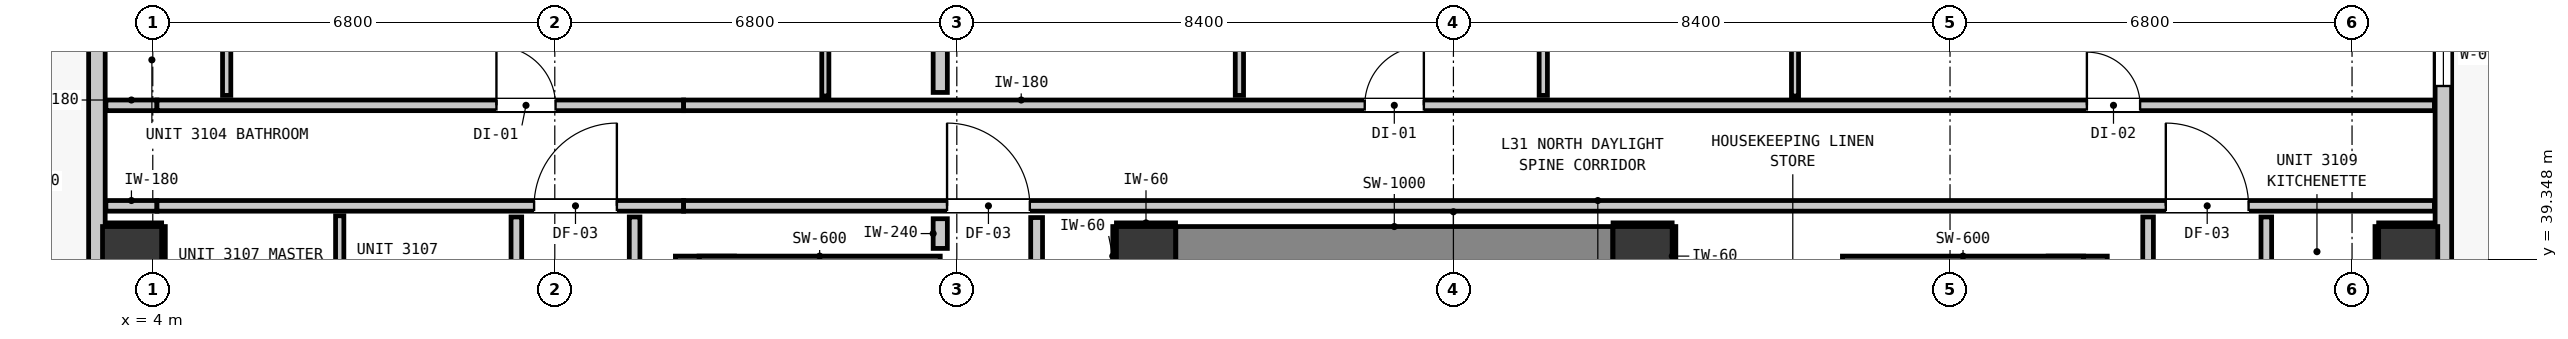
"""IFC4 building model, lengths in metres.
Left out: names, types, materials, properties, quantities, classifications, styles, units other than length and angle.
Written with IfcOpenShell. Run it as: python <this file> out.ifc"""

import sys

from ifc_helpers import new_model, si_unit, direction, frame, frame_2d, origin, origin_2d, place, context, subcontext, project, spatial, rectangle, extrude, element, fill, save


model = new_model("IFC4")
c1 = context("Model", 3, precision=1e-05, world=origin(), true_north=direction((0.0, 1.0)))
c2 = subcontext(c1, "Body", "Model", "MODEL_VIEW")
j1 = project(units=[si_unit("LENGTHUNIT", "METRE"), si_unit("PLANEANGLEUNIT", "RADIAN")], contexts=[c1])
p1 = place(None, origin())
s1 = spatial("IfcSite", under=j1, at=p1, CompositionType="ELEMENT")
p2 = place(p1, origin())
s2 = spatial("IfcBuilding", under=s1, at=p2, CompositionType="ELEMENT")
p3 = place(p2, frame((0.0, 0.0, 109.4)))
s3 = spatial("IfcBuildingStorey", under=s2, at=p3, CompositionType="ELEMENT", Elevation=109.4)
for number, where, z_axis, x_axis in (
    (1, (20.8, 39.4, 0.0), (0.0, 0.0, 1.0), (1.0, 0.0, 0.0)),
    (2, (29.2, 39.4, 0.0), (0.0, 0.0, 1.0), (1.0, 0.0, 0.0)),
):
    element("IfcColumn", number, at=place(p3, frame(where, z_axis=z_axis, x_axis=x_axis)), inside=s3, PredefinedType="COLUMN", context=c2, shape_type="SweptSolid", body=[
        extrude(rectangle(XDim=1.0, YDim=1.0, at=origin_2d()), origin(), (0.0, 0.0, 1.0), 3.32),
    ])
p4 = place(p3, frame((13.34, 31.205, 0.0), z_axis=(0.0, 0.0, 1.0), x_axis=(0.0, 1.0, 0.0)))
e3 = element("IfcWall", 3, at=p4, inside=s3, PredefinedType="SHEAR", context=c2, shape_type="SweptSolid", body=[
    extrude(rectangle(XDim=8.195, YDim=1.0, at=frame_2d((4.097, 0.0))), origin(), (0.0, 0.0, 1.0), 3.32),
])
p5 = place(p3, frame((13.24, 39.1, 0.0), z_axis=(0.0, 0.0, 1.0), x_axis=(1.0, 0.0, 0.0)))
e4 = element("IfcWall", 4, at=p5, inside=s3, PredefinedType="SHEAR", context=c2, shape_type="SweptSolid", body=[
    extrude(rectangle(XDim=4.08, YDim=0.6, at=frame_2d((2.04, 0.0))), origin(), (0.0, 0.0, 1.0), 3.32),
])
p6 = place(p3, frame((36.56, 31.205, 0.0), z_axis=(0.0, 0.0, 1.0), x_axis=(0.0, 1.0, 0.0)))
e5 = element("IfcWall", 5, at=p6, inside=s3, PredefinedType="SHEAR", context=c2, shape_type="SweptSolid", body=[
    extrude(rectangle(XDim=8.195, YDim=1.0, at=frame_2d((4.097, 0.0))), origin(), (0.0, 0.0, 1.0), 3.32),
])
p7 = place(p3, frame((32.58, 39.1, 0.0), z_axis=(0.0, 0.0, 1.0), x_axis=(1.0, 0.0, 0.0)))
e6 = element("IfcWall", 6, at=p7, inside=s3, PredefinedType="SHEAR", context=c2, shape_type="SweptSolid", body=[
    extrude(rectangle(XDim=4.08, YDim=0.6, at=frame_2d((2.04, 0.0))), origin(), (0.0, 0.0, 1.0), 3.32),
])
p8 = place(p3, frame((21.305, 39.4, 0.0), z_axis=(0.0, 0.0, 1.0), x_axis=(1.0, 0.0, 0.0)))
e7 = element("IfcWall", 7, at=p8, inside=s3, PredefinedType="SHEAR", context=c2, shape_type="SweptSolid", body=[
    extrude(rectangle(XDim=7.39, YDim=1.0, at=frame_2d((3.695, 0.0))), origin(), (0.0, 0.0, 1.0), 3.32),
])
for number, where, z_axis, x_axis in (
    (8, (3.65, 39.4, 0.0), (0.0, 0.0, 1.0), (1.0, 0.0, 0.0)),
    (9, (42.15, 39.4, 0.0), (0.0, 0.0, 1.0), (1.0, 0.0, 0.0)),
):
    element("IfcColumn", number, at=place(p3, frame(where, z_axis=z_axis, x_axis=x_axis)), inside=s3, PredefinedType="COLUMN", context=c2, shape_type="SweptSolid", body=[
        extrude(rectangle(XDim=1.0, YDim=1.0, at=origin_2d()), origin(), (0.0, 0.0, 1.0), 3.32),
    ])
p9 = place(p3, frame((3.055, 11.355, 0.0), z_axis=(0.0, 0.0, 1.0), x_axis=(0.0, 1.0, 0.0)))
e10 = element("IfcWall", 10, at=p9, inside=s3, PredefinedType="STANDARD", context=c2, shape_type="SweptSolid", body=[
    extrude(rectangle(XDim=32.29, YDim=0.28, at=frame_2d((16.145, 0.0))), origin(), (0.0, 0.0, 1.0), 3.08),
])
p10 = place(p9, frame((5.818, 0.0, 0.0)))
e11 = element("IfcOpeningElement", 11, at=p10, cuts=e10, PredefinedType="OPENING", context=c2, shape_type="SweptSolid", body=[
    extrude(rectangle(XDim=1.0, YDim=2.15, at=frame_2d((0.5, 1.075))), frame((0.0, 0.15, 0.0), z_axis=(0.0, -1.0, 0.0), x_axis=(1.0, 0.0, 0.0)), (0.0, 0.0, 1.0), 0.3),
])
p11 = place(p9, frame((0.545, 0.0, 0.85)))
e12 = element("IfcOpeningElement", 12, at=p11, cuts=e10, PredefinedType="OPENING", context=c2, shape_type="SweptSolid", body=[
    extrude(rectangle(XDim=1.05, YDim=1.65, at=frame_2d((0.525, 0.825))), frame((0.0, 0.15, 0.0), z_axis=(0.0, -1.0, 0.0), x_axis=(1.0, 0.0, 0.0)), (0.0, 0.0, 1.0), 0.3),
])
p12 = place(p9, frame((13.124, 0.0, 0.85)))
e13 = element("IfcOpeningElement", 13, at=p12, cuts=e10, PredefinedType="OPENING", context=c2, shape_type="SweptSolid", body=[
    extrude(rectangle(XDim=2.7, YDim=2.0, at=frame_2d((1.35, 1.0))), frame((0.0, 0.15, 0.0), z_axis=(0.0, -1.0, 0.0), x_axis=(1.0, 0.0, 0.0)), (0.0, 0.0, 1.0), 0.3),
])
p13 = place(p9, frame((17.188, 0.0, 0.85)))
e14 = element("IfcOpeningElement", 14, at=p13, cuts=e10, PredefinedType="OPENING", context=c2, shape_type="SweptSolid", body=[
    extrude(rectangle(XDim=1.05, YDim=1.65, at=frame_2d((0.525, 0.825))), frame((0.0, 0.15, 0.0), z_axis=(0.0, -1.0, 0.0), x_axis=(1.0, 0.0, 0.0)), (0.0, 0.0, 1.0), 0.3),
])
p14 = place(p9, frame((22.674, 0.0, 0.85)))
e15 = element("IfcOpeningElement", 15, at=p14, cuts=e10, PredefinedType="OPENING", context=c2, shape_type="SweptSolid", body=[
    extrude(rectangle(XDim=2.7, YDim=2.0, at=frame_2d((1.35, 1.0))), frame((0.0, 0.15, 0.0), z_axis=(0.0, -1.0, 0.0), x_axis=(1.0, 0.0, 0.0)), (0.0, 0.0, 1.0), 0.3),
])
p15 = place(p9, frame((26.312, 0.0, 0.85)))
e16 = element("IfcOpeningElement", 16, at=p15, cuts=e10, PredefinedType="OPENING", context=c2, shape_type="SweptSolid", body=[
    extrude(rectangle(XDim=1.05, YDim=1.65, at=frame_2d((0.525, 0.825))), frame((0.0, 0.15, 0.0), z_axis=(0.0, -1.0, 0.0), x_axis=(1.0, 0.0, 0.0)), (0.0, 0.0, 1.0), 0.3),
])
p16 = place(p3, frame((42.745, 43.645, 0.0), z_axis=(0.0, 0.0, 1.0), x_axis=(0.0, -1.0, 0.0)))
e17 = element("IfcWall", 17, at=p16, inside=s3, PredefinedType="STANDARD", context=c2, shape_type="SweptSolid", body=[
    extrude(rectangle(XDim=32.29, YDim=0.28, at=frame_2d((16.145, 0.0))), origin(), (0.0, 0.0, 1.0), 3.08),
])
p17 = place(p16, frame((6.871, 0.0, 0.0)))
e18 = element("IfcOpeningElement", 18, at=p17, cuts=e17, PredefinedType="OPENING", context=c2, shape_type="SweptSolid", body=[
    extrude(rectangle(XDim=1.0, YDim=2.15, at=frame_2d((0.5, 1.075))), frame((0.0, 0.15, 0.0), z_axis=(0.0, -1.0, 0.0), x_axis=(1.0, 0.0, 0.0)), (0.0, 0.0, 1.0), 0.3),
])
p18 = place(p16, frame((0.318, 0.0, 0.85)))
e19 = element("IfcOpeningElement", 19, at=p18, cuts=e17, PredefinedType="OPENING", context=c2, shape_type="SweptSolid", body=[
    extrude(rectangle(XDim=1.05, YDim=1.65, at=frame_2d((0.525, 0.825))), frame((0.0, 0.15, 0.0), z_axis=(0.0, -1.0, 0.0), x_axis=(1.0, 0.0, 0.0)), (0.0, 0.0, 1.0), 0.3),
])
p19 = place(p16, frame((16.37, 0.0, 0.85)))
e20 = element("IfcOpeningElement", 20, at=p19, cuts=e17, PredefinedType="OPENING", context=c2, shape_type="SweptSolid", body=[
    extrude(rectangle(XDim=2.7, YDim=2.0, at=frame_2d((1.35, 1.0))), frame((0.0, 0.15, 0.0), z_axis=(0.0, -1.0, 0.0), x_axis=(1.0, 0.0, 0.0)), (0.0, 0.0, 1.0), 0.3),
])
p20 = place(p16, frame((8.452, 0.0, 0.85)))
e21 = element("IfcOpeningElement", 21, at=p20, cuts=e17, PredefinedType="OPENING", context=c2, shape_type="SweptSolid", body=[
    extrude(rectangle(XDim=1.05, YDim=1.65, at=frame_2d((0.525, 0.825))), frame((0.0, 0.15, 0.0), z_axis=(0.0, -1.0, 0.0), x_axis=(1.0, 0.0, 0.0)), (0.0, 0.0, 1.0), 0.3),
])
p21 = place(p3, frame((3.207, 40.25, 0.0), z_axis=(0.0, 0.0, 1.0), x_axis=(1.0, 0.0, 0.0)))
e22 = element("IfcWall", 22, at=p21, inside=s3, PredefinedType="PARTITIONING", context=c2, shape_type="SweptSolid", body=[
    extrude(rectangle(XDim=0.864, YDim=0.18, at=frame_2d((0.432, 0.0))), origin(), (0.0, 0.0, 1.0), 3.08),
])
p22 = place(p3, frame((4.071, 40.25, 0.0), z_axis=(0.0, 0.0, 1.0), x_axis=(1.0, 0.0, 0.0)))
e23 = element("IfcWall", 23, at=p22, inside=s3, PredefinedType="PARTITIONING", context=c2, shape_type="SweptSolid", body=[
    extrude(rectangle(XDim=8.908, YDim=0.18, at=frame_2d((4.454, 0.0))), origin(), (0.0, 0.0, 1.0), 2.565),
])
p23 = place(p22, frame((6.379, 0.0, 0.0)))
e24 = element("IfcOpeningElement", 24, at=p23, cuts=e23, PredefinedType="OPENING", context=c2, shape_type="SweptSolid", body=[
    extrude(rectangle(XDim=1.4, YDim=2.15, at=frame_2d((0.7, 1.075))), frame((0.0, 0.1, 0.0), z_axis=(0.0, -1.0, 0.0), x_axis=(1.0, 0.0, 0.0)), (0.0, 0.0, 1.0), 0.2),
])
p24 = place(p3, frame((12.979, 40.25, 0.0), z_axis=(0.0, 0.0, 1.0), x_axis=(1.0, 0.0, 0.0)))
e25 = element("IfcWall", 25, at=p24, inside=s3, PredefinedType="PARTITIONING", context=c2, shape_type="SweptSolid", body=[
    extrude(rectangle(XDim=29.614, YDim=0.18, at=frame_2d((14.807, 0.0))), origin(), (0.0, 0.0, 1.0), 3.08),
])
p25 = place(p24, frame((4.456, 0.0, 0.0)))
e26 = element("IfcOpeningElement", 26, at=p25, cuts=e25, PredefinedType="OPENING", context=c2, shape_type="SweptSolid", body=[
    extrude(rectangle(XDim=1.4, YDim=2.15, at=frame_2d((0.7, 1.075))), frame((0.0, 0.1, 0.0), z_axis=(0.0, -1.0, 0.0), x_axis=(1.0, 0.0, 0.0)), (0.0, 0.0, 1.0), 0.2),
])
p26 = place(p24, frame((25.071, 0.0, 0.0)))
e27 = element("IfcOpeningElement", 27, at=p26, cuts=e25, PredefinedType="OPENING", context=c2, shape_type="SweptSolid", body=[
    extrude(rectangle(XDim=1.4, YDim=2.15, at=frame_2d((0.7, 1.075))), frame((0.0, 0.1, 0.0), z_axis=(0.0, -1.0, 0.0), x_axis=(1.0, 0.0, 0.0)), (0.0, 0.0, 1.0), 0.2),
])
p27 = place(p3, frame((3.207, 41.95, 0.0), z_axis=(0.0, 0.0, 1.0), x_axis=(1.0, 0.0, 0.0)))
e28 = element("IfcWall", 28, at=p27, inside=s3, PredefinedType="PARTITIONING", context=c2, shape_type="SweptSolid", body=[
    extrude(rectangle(XDim=0.864, YDim=0.18, at=frame_2d((0.432, 0.0))), origin(), (0.0, 0.0, 1.0), 3.08),
])
p28 = place(p3, frame((4.071, 41.95, 0.0), z_axis=(0.0, 0.0, 1.0), x_axis=(1.0, 0.0, 0.0)))
e29 = element("IfcWall", 29, at=p28, inside=s3, PredefinedType="PARTITIONING", context=c2, shape_type="SweptSolid", body=[
    extrude(rectangle(XDim=8.908, YDim=0.18, at=frame_2d((4.454, 0.0))), origin(), (0.0, 0.0, 1.0), 2.565),
])
p29 = place(p28, frame((5.742, 0.0, 0.0)))
e30 = element("IfcOpeningElement", 30, at=p29, cuts=e29, PredefinedType="OPENING", context=c2, shape_type="SweptSolid", body=[
    extrude(rectangle(XDim=1.0, YDim=2.15, at=frame_2d((0.5, 1.075))), frame((0.0, 0.1, 0.0), z_axis=(0.0, -1.0, 0.0), x_axis=(1.0, 0.0, 0.0)), (0.0, 0.0, 1.0), 0.2),
])
p30 = place(p3, frame((12.979, 41.95, 0.0), z_axis=(0.0, 0.0, 1.0), x_axis=(1.0, 0.0, 0.0)))
e31 = element("IfcWall", 31, at=p30, inside=s3, PredefinedType="PARTITIONING", context=c2, shape_type="SweptSolid", body=[
    extrude(rectangle(XDim=29.614, YDim=0.18, at=frame_2d((14.807, 0.0))), origin(), (0.0, 0.0, 1.0), 3.08),
])
p31 = place(p30, frame((11.521, 0.0, 0.0)))
e32 = element("IfcOpeningElement", 32, at=p31, cuts=e31, PredefinedType="OPENING", context=c2, shape_type="SweptSolid", body=[
    extrude(rectangle(XDim=1.0, YDim=2.15, at=frame_2d((0.5, 1.075))), frame((0.0, 0.1, 0.0), z_axis=(0.0, -1.0, 0.0), x_axis=(1.0, 0.0, 0.0)), (0.0, 0.0, 1.0), 0.2),
])
p32 = place(p30, frame((23.736, 0.0, 0.0)))
e33 = element("IfcOpeningElement", 33, at=p32, cuts=e31, PredefinedType="OPENING", context=c2, shape_type="SweptSolid", body=[
    extrude(rectangle(XDim=0.9, YDim=2.1, at=frame_2d((0.45, 1.05))), frame((0.0, 0.1, 0.0), z_axis=(0.0, -1.0, 0.0), x_axis=(1.0, 0.0, 0.0)), (0.0, 0.0, 1.0), 0.2),
])
p33 = place(p3, frame((17.32, 39.53, 0.0), z_axis=(0.0, 0.0, 1.0), x_axis=(0.0, 1.0, 0.0)))
e34 = element("IfcWall", 34, at=p33, inside=s3, PredefinedType="PARTITIONING", context=c2, shape_type="SweptSolid", body=[
    extrude(rectangle(XDim=0.502, YDim=0.24, at=frame_2d((0.251, 0.0))), origin(), (0.0, 0.0, 1.0), 3.08),
])
p34 = place(p3, frame((17.32, 42.168, 0.0), z_axis=(0.0, 0.0, 1.0), x_axis=(0.0, 1.0, 0.0)))
e35 = element("IfcWall", 35, at=p34, inside=s3, PredefinedType="PARTITIONING", context=c2, shape_type="SweptSolid", body=[
    extrude(rectangle(XDim=3.625, YDim=0.24, at=frame_2d((1.812, 0.0))), origin(), (0.0, 0.0, 1.0), 3.08),
])
p35 = place(p3, frame((18.95, 38.918, 0.0), z_axis=(0.0, 0.0, 1.0), x_axis=(0.0, 1.0, 0.0)))
e36 = element("IfcWall", 36, at=p35, inside=s3, PredefinedType="PARTITIONING", context=c2, shape_type="SweptSolid", body=[
    extrude(rectangle(XDim=1.134, YDim=0.2, at=frame_2d((0.567, 0.0))), origin(), (0.0, 0.0, 1.0), 3.08),
])
p36 = place(p3, frame((10.15, 37.553, 0.0), z_axis=(0.0, 0.0, 1.0), x_axis=(0.0, 1.0, 0.0)))
e37 = element("IfcWall", 37, at=p36, inside=s3, PredefinedType="PARTITIONING", context=c2, shape_type="SweptSolid", body=[
    extrude(rectangle(XDim=2.509, YDim=0.18, at=frame_2d((1.254, 0.0))), origin(), (0.0, 0.0, 1.0), 3.08),
])
for number, where, z_axis, x_axis in (
    (38, (12.15, 21.368, 0.0), (0.0, 0.0, 1.0), (0.0, 1.0, 0.0)),
    (39, (37.75, 21.368, 0.0), (0.0, 0.0, 1.0), (0.0, 1.0, 0.0)),
):
    element("IfcWall", number, at=place(p3, frame(where, z_axis=z_axis, x_axis=x_axis)), inside=s3, PredefinedType="PARTITIONING", context=c2, shape_type="SweptSolid", body=[
        extrude(rectangle(XDim=18.694, YDim=0.18, at=frame_2d((9.347, 0.0))), origin(), (0.0, 0.0, 1.0), 3.08),
    ])
p37 = place(p3, frame((39.75, 37.553, 0.0), z_axis=(0.0, 0.0, 1.0), x_axis=(0.0, 1.0, 0.0)))
e40 = element("IfcWall", 40, at=p37, inside=s3, PredefinedType="PARTITIONING", context=c2, shape_type="SweptSolid", body=[
    extrude(rectangle(XDim=2.509, YDim=0.18, at=frame_2d((1.254, 0.0))), origin(), (0.0, 0.0, 1.0), 3.08),
])
p38 = place(p3, frame((5.25, 42.118, 0.0), z_axis=(0.0, 0.0, 1.0), x_axis=(0.0, 1.0, 0.0)))
e41 = element("IfcWall", 41, at=p38, inside=s3, PredefinedType="PARTITIONING", context=c2, shape_type="SweptSolid", body=[
    extrude(rectangle(XDim=3.507, YDim=0.14, at=frame_2d((1.753, 0.0))), origin(), (0.0, 0.0, 1.0), 3.08),
])
p39 = place(p38, frame((1.327, 0.0, 0.0)))
e42 = element("IfcOpeningElement", 42, at=p39, cuts=e41, PredefinedType="OPENING", context=c2, shape_type="SweptSolid", body=[
    extrude(rectangle(XDim=0.86, YDim=2.02, at=frame_2d((0.43, 1.01))), frame((0.0, 0.08, 0.0), z_axis=(0.0, -1.0, 0.0), x_axis=(1.0, 0.0, 0.0)), (0.0, 0.0, 1.0), 0.16),
])
p40 = place(p3, frame((7.162, 37.533, 0.0), z_axis=(0.0, 0.0, 1.0), x_axis=(0.0, 1.0, 0.0)))
e43 = element("IfcWall", 43, at=p40, inside=s3, PredefinedType="PARTITIONING", context=c2, shape_type="SweptSolid", body=[
    extrude(rectangle(XDim=2.549, YDim=0.14, at=frame_2d((1.274, 0.0))), origin(), (0.0, 0.0, 1.0), 3.08),
])
p41 = place(p3, frame((22.38, 42.118, 0.0), z_axis=(0.0, 0.0, 1.0), x_axis=(0.0, 1.0, 0.0)))
e44 = element("IfcWall", 44, at=p41, inside=s3, PredefinedType="PARTITIONING", context=c2, shape_type="SweptSolid", body=[
    extrude(rectangle(XDim=3.675, YDim=0.14, at=frame_2d((1.837, 0.0))), origin(), (0.0, 0.0, 1.0), 3.08),
])
p42 = place(p41, frame((1.327, 0.0, 0.0)))
e45 = element("IfcOpeningElement", 45, at=p42, cuts=e44, PredefinedType="OPENING", context=c2, shape_type="SweptSolid", body=[
    extrude(rectangle(XDim=0.86, YDim=2.02, at=frame_2d((0.43, 1.01))), frame((0.0, 0.08, 0.0), z_axis=(0.0, -1.0, 0.0), x_axis=(1.0, 0.0, 0.0)), (0.0, 0.0, 1.0), 0.16),
])
p43 = place(p3, frame((27.52, 42.118, 0.0), z_axis=(0.0, 0.0, 1.0), x_axis=(0.0, 1.0, 0.0)))
e46 = element("IfcWall", 46, at=p43, inside=s3, PredefinedType="PARTITIONING", context=c2, shape_type="SweptSolid", body=[
    extrude(rectangle(XDim=3.675, YDim=0.14, at=frame_2d((1.837, 0.0))), origin(), (0.0, 0.0, 1.0), 3.08),
])
p44 = place(p43, frame((1.307, 0.0, 0.0)))
e47 = element("IfcOpeningElement", 47, at=p44, cuts=e46, PredefinedType="OPENING", context=c2, shape_type="SweptSolid", body=[
    extrude(rectangle(XDim=0.9, YDim=2.1, at=frame_2d((0.45, 1.05))), frame((0.0, 0.08, 0.0), z_axis=(0.0, -1.0, 0.0), x_axis=(1.0, 0.0, 0.0)), (0.0, 0.0, 1.0), 0.16),
])
p45 = place(p3, frame((15.376, 42.108, 0.0), z_axis=(0.0, 0.0, 1.0), x_axis=(0.0, 1.0, 0.0)))
e48 = element("IfcWall", 48, at=p45, inside=s3, PredefinedType="PARTITIONING", context=c2, shape_type="SweptSolid", body=[
    extrude(rectangle(XDim=3.685, YDim=0.12, at=frame_2d((1.843, 0.0))), origin(), (0.0, 0.0, 1.0), 3.08),
])
p46 = place(p45, frame((1.317, 0.0, 0.0)))
e49 = element("IfcOpeningElement", 49, at=p46, cuts=e48, PredefinedType="OPENING", context=c2, shape_type="SweptSolid", body=[
    extrude(rectangle(XDim=0.9, YDim=2.1, at=frame_2d((0.45, 1.05))), frame((0.0, 0.07, 0.0), z_axis=(0.0, -1.0, 0.0), x_axis=(1.0, 0.0, 0.0)), (0.0, 0.0, 1.0), 0.14),
])
p47 = place(p3, frame((31.778, 42.108, 0.0), z_axis=(0.0, 0.0, 1.0), x_axis=(0.0, 1.0, 0.0)))
e50 = element("IfcWall", 50, at=p47, inside=s3, PredefinedType="PARTITIONING", context=c2, shape_type="SweptSolid", body=[
    extrude(rectangle(XDim=3.685, YDim=0.12, at=frame_2d((1.843, 0.0))), origin(), (0.0, 0.0, 1.0), 3.08),
])
for number, where, z_axis, x_axis in (
    (51, (20.3, 39.932, 0.0), (0.0, 0.0, 1.0), (1.0, 0.0, 0.0)),
    (52, (20.268, 38.9, 0.0), (0.0, 0.0, 1.0), (0.0, 1.0, 0.0)),
    (53, (28.7, 39.932, 0.0), (0.0, 0.0, 1.0), (1.0, 0.0, 0.0)),
    (54, (29.732, 38.9, 0.0), (0.0, 0.0, 1.0), (0.0, 1.0, 0.0)),
):
    element("IfcWall", number, at=place(p3, frame(where, z_axis=z_axis, x_axis=x_axis)), inside=s3, PredefinedType="PARTITIONING", context=c2, shape_type="SweptSolid", body=[
        extrude(rectangle(XDim=1.0, YDim=0.06, at=frame_2d((0.5, 0.0))), origin(), (0.0, 0.0, 1.0), 1.45),
    ])
p48 = place(p3, frame((3.21, 39.932, 0.0), z_axis=(0.0, 0.0, 1.0), x_axis=(1.0, 0.0, 0.0)))
e55 = element("IfcWall", 55, at=p48, inside=s3, PredefinedType="PARTITIONING", context=c2, shape_type="SweptSolid", body=[
    extrude(rectangle(XDim=0.94, YDim=0.06, at=frame_2d((0.47, 0.0))), origin(), (0.0, 0.0, 1.0), 1.45),
])
p49 = place(p3, frame((4.182, 38.9, 0.0), z_axis=(0.0, 0.0, 1.0), x_axis=(0.0, 1.0, 0.0)))
e56 = element("IfcWall", 56, at=p49, inside=s3, PredefinedType="PARTITIONING", context=c2, shape_type="SweptSolid", body=[
    extrude(rectangle(XDim=1.0, YDim=0.06, at=frame_2d((0.5, 0.0))), origin(), (0.0, 0.0, 1.0), 1.45),
])
p50 = place(p3, frame((41.65, 39.932, 0.0), z_axis=(0.0, 0.0, 1.0), x_axis=(1.0, 0.0, 0.0)))
e57 = element("IfcWall", 57, at=p50, inside=s3, PredefinedType="PARTITIONING", context=c2, shape_type="SweptSolid", body=[
    extrude(rectangle(XDim=0.94, YDim=0.06, at=frame_2d((0.47, 0.0))), origin(), (0.0, 0.0, 1.0), 1.45),
])
p51 = place(p3, frame((41.618, 38.9, 0.0), z_axis=(0.0, 0.0, 1.0), x_axis=(0.0, 1.0, 0.0)))
e58 = element("IfcWall", 58, at=p51, inside=s3, PredefinedType="PARTITIONING", context=c2, shape_type="SweptSolid", body=[
    extrude(rectangle(XDim=1.0, YDim=0.06, at=frame_2d((0.5, 0.0))), origin(), (0.0, 0.0, 1.0), 1.45),
])
p52 = place(p18, origin())
e59 = element("IfcWindow", 59, at=p52, inside=s3, PartitioningType="SINGLE_PANEL", PredefinedType="WINDOW", context=c2, shape_type="SweptSolid", body=[
    extrude(rectangle(XDim=1.05, YDim=1.65, at=frame_2d((0.525, 0.825))), frame((0.0, 0.03, 0.0), z_axis=(0.0, -1.0, 0.0), x_axis=(1.0, 0.0, 0.0)), (0.0, 0.0, 1.0), 0.06),
])
fill(e19, e59)
p53 = place(p25, origin())
e60 = element("IfcDoor", 60, at=p53, inside=s3, OperationType="SINGLE_SWING_LEFT", PredefinedType="DOOR", context=c2, shape_type="SweptSolid", body=[
    extrude(rectangle(XDim=1.4, YDim=2.15, at=frame_2d((0.7, 1.075))), frame((0.0, 0.025, 0.0), z_axis=(0.0, -1.0, 0.0), x_axis=(1.0, 0.0, 0.0)), (0.0, 0.0, 1.0), 0.05),
])
fill(e26, e60)
p54 = place(p23, origin())
e61 = element("IfcDoor", 61, at=p54, inside=s3, OperationType="SINGLE_SWING_RIGHT", PredefinedType="DOOR", context=c2, shape_type="SweptSolid", body=[
    extrude(rectangle(XDim=1.4, YDim=2.15, at=frame_2d((0.7, 1.075))), frame((0.0, 0.025, 0.0), z_axis=(0.0, -1.0, 0.0), x_axis=(1.0, 0.0, 0.0)), (0.0, 0.0, 1.0), 0.05),
])
fill(e24, e61)
p55 = place(p26, origin())
e62 = element("IfcDoor", 62, at=p55, inside=s3, OperationType="SINGLE_SWING_LEFT", PredefinedType="DOOR", context=c2, shape_type="SweptSolid", body=[
    extrude(rectangle(XDim=1.4, YDim=2.15, at=frame_2d((0.7, 1.075))), frame((0.0, 0.025, 0.0), z_axis=(0.0, -1.0, 0.0), x_axis=(1.0, 0.0, 0.0)), (0.0, 0.0, 1.0), 0.05),
])
fill(e27, e62)
p56 = place(p29, origin())
e63 = element("IfcDoor", 63, at=p56, inside=s3, OperationType="SINGLE_SWING_LEFT", PredefinedType="DOOR", context=c2, shape_type="SweptSolid", body=[
    extrude(rectangle(XDim=1.0, YDim=2.15, at=frame_2d((0.5, 1.075))), frame((0.0, 0.025, 0.0), z_axis=(0.0, -1.0, 0.0), x_axis=(1.0, 0.0, 0.0)), (0.0, 0.0, 1.0), 0.05),
])
fill(e30, e63)
p57 = place(p31, origin())
e64 = element("IfcDoor", 64, at=p57, inside=s3, OperationType="SINGLE_SWING_RIGHT", PredefinedType="DOOR", context=c2, shape_type="SweptSolid", body=[
    extrude(rectangle(XDim=1.0, YDim=2.15, at=frame_2d((0.5, 1.075))), frame((0.0, 0.025, 0.0), z_axis=(0.0, -1.0, 0.0), x_axis=(1.0, 0.0, 0.0)), (0.0, 0.0, 1.0), 0.05),
])
fill(e32, e64)
p58 = place(p32, origin())
e65 = element("IfcDoor", 65, at=p58, inside=s3, OperationType="SINGLE_SWING_LEFT", PredefinedType="DOOR", context=c2, shape_type="SweptSolid", body=[
    extrude(rectangle(XDim=0.9, YDim=2.1, at=frame_2d((0.45, 1.05))), frame((0.0, 0.025, 0.0), z_axis=(0.0, -1.0, 0.0), x_axis=(1.0, 0.0, 0.0)), (0.0, 0.0, 1.0), 0.05),
])
fill(e33, e65)
save(model, sys.argv[1])
